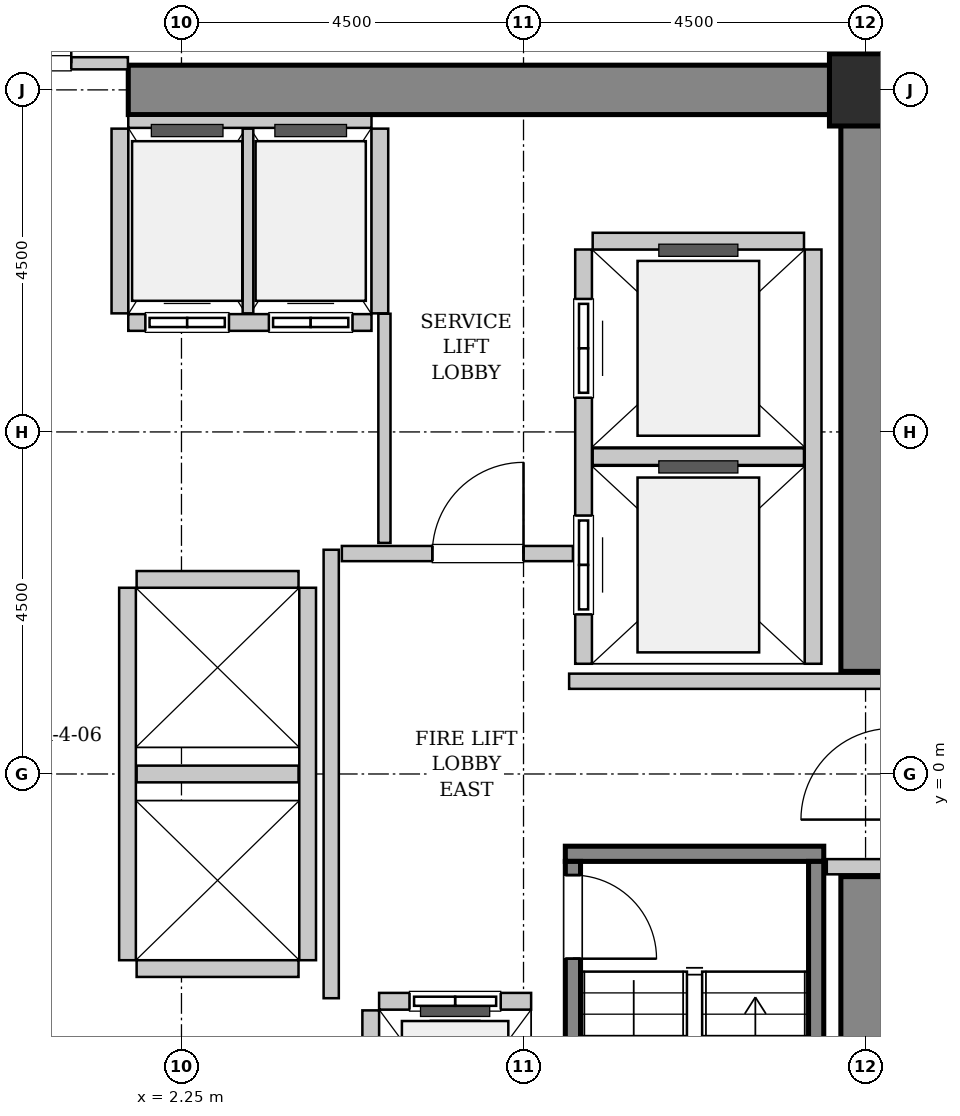
"""IFC4 building model, lengths in metres.
Left out: names, types, materials, properties, quantities, classifications, styles, units other than length and angle.
Written with IfcOpenShell. Run it as: python <this file> out.ifc"""

import sys

from ifc_helpers import new_model, si_unit, direction, frame, frame_2d, origin, origin_2d, place, context, subcontext, project, spatial, rectangle, hollow_rectangle, extrude, source, transform, mapped, element, fill, save


model = new_model("IFC4")
c1 = context("Model", 3, precision=1e-05, world=origin(), true_north=direction((0.0, 1.0)))
c2 = subcontext(c1, "Body", "Model", "MODEL_VIEW")
j1 = project(units=[si_unit("LENGTHUNIT", "METRE"), si_unit("PLANEANGLEUNIT", "RADIAN")], contexts=[c1])
p1 = place(None, origin())
s1 = spatial("IfcSite", under=j1, at=p1, CompositionType="ELEMENT")
p2 = place(p1, origin())
s2 = spatial("IfcBuilding", under=s1, at=p2, CompositionType="ELEMENT")
p3 = place(p2, frame((0.0, 0.0, 82.4)))
s3 = spatial("IfcBuildingStorey", under=s2, at=p3, CompositionType="ELEMENT", Elevation=82.4)
m1 = source(origin(), c2, "Body", "SweptSolid", [
    extrude(rectangle(XDim=10.025, YDim=0.65, at=frame_2d((5.012, 0.0))), origin(), (0.0, 0.0, 1.0), 3.8),
])
p4 = place(p3, frame((1.55, 9.0, 0.0), z_axis=(0.0, 0.0, 1.0), x_axis=(1.0, 0.0, 0.0)))
e1 = element("IfcWall", 1, at=p4, inside=s3, PredefinedType="SHEAR", context=c2, shape_type="MappedRepresentation", body=[
    mapped(m1, transform((0.0, 0.0, 0.0), x_axis=(1.0, 0.0, 0.0), y_axis=(0.0, 1.0, 0.0), z_axis=(0.0, 0.0, 1.0), scale=1.0)),
])
m2 = source(origin(), c2, "Body", "SweptSolid", [
    extrude(rectangle(XDim=7.325, YDim=0.65, at=frame_2d((3.663, 0.0))), origin(), (0.0, 0.0, 1.0), 3.8),
])
for number, where, z_axis, x_axis in (
    (2, (11.25, -8.675, 0.0), (0.0, 0.0, 1.0), (0.0, 1.0, 0.0)),
    (3, (11.25, 1.35, 0.0), (0.0, 0.0, 1.0), (0.0, 1.0, 0.0)),
):
    element("IfcWall", number, at=place(p3, frame(where, z_axis=z_axis, x_axis=x_axis)), inside=s3, PredefinedType="SHEAR", context=c2, shape_type="MappedRepresentation", body=[
        mapped(m2, transform((0.0, 0.0, 0.0), x_axis=(1.0, 0.0, 0.0), y_axis=(0.0, 1.0, 0.0), z_axis=(0.0, 0.0, 1.0), scale=1.0)),
    ])
m3 = source(origin(), c2, "Body", "SweptSolid", [
    extrude(hollow_rectangle(XDim=0.95, YDim=0.95, WallThickness=0.045, InnerFilletRadius=0.045, OuterFilletRadius=0.09, at=origin_2d()), origin(), (0.0, 0.0, 1.0), 3.8),
])
p5 = place(p3, frame((11.25, 9.0, 0.0), z_axis=(0.0, 0.0, 1.0), x_axis=(1.0, 0.0, 0.0)))
e4 = element("IfcColumn", 4, at=p5, inside=s3, PredefinedType="COLUMN", context=c2, shape_type="MappedRepresentation", body=[
    mapped(m3, transform((0.0, 0.0, 0.0), x_axis=(1.0, 0.0, 0.0), y_axis=(0.0, 1.0, 0.0), z_axis=(0.0, 0.0, 1.0), scale=1.0)),
])
m4 = source(origin(), c2, "Body", "SweptSolid", [
    extrude(rectangle(XDim=3.4, YDim=0.2, at=frame_2d((1.7, 0.0))), origin(), (0.0, 0.0, 1.0), 3.8),
])
p6 = place(p3, frame((7.3, -1.05, 0.0), z_axis=(0.0, 0.0, 1.0), x_axis=(1.0, 0.0, 0.0)))
e5 = element("IfcWall", 5, at=p6, inside=s3, PredefinedType="SOLIDWALL", context=c2, shape_type="MappedRepresentation", body=[
    mapped(m4, transform((0.0, 0.0, 0.0), x_axis=(1.0, 0.0, 0.0), y_axis=(0.0, 1.0, 0.0), z_axis=(0.0, 0.0, 1.0), scale=1.0)),
])
m5 = source(origin(), c2, "Body", "SweptSolid", [
    extrude(rectangle(XDim=7.1, YDim=0.2, at=frame_2d((3.55, 0.0))), origin(), (0.0, 0.0, 1.0), 3.8),
])
p7 = place(p3, frame((7.4, -1.15, 0.0), z_axis=(0.0, 0.0, 1.0), x_axis=(0.0, -1.0, 0.0)))
e6 = element("IfcWall", 6, at=p7, inside=s3, PredefinedType="SOLIDWALL", context=c2, shape_type="MappedRepresentation", body=[
    mapped(m5, transform((0.0, 0.0, 0.0), x_axis=(1.0, 0.0, 0.0), y_axis=(0.0, 1.0, 0.0), z_axis=(0.0, 0.0, 1.0), scale=1.0)),
])
p8 = place(p7, frame((0.18, 0.0, 0.0)))
e7 = element("IfcOpeningElement", 7, at=p8, cuts=e6, PredefinedType="OPENING", context=c2, shape_type="SweptSolid", body=[
    extrude(rectangle(XDim=1.1, YDim=2.15, at=frame_2d((0.55, 1.075))), frame((0.0, 0.11, 0.0), z_axis=(0.0, -1.0, 0.0), x_axis=(1.0, 0.0, 0.0)), (0.0, 0.0, 1.0), 0.22),
])
p9 = place(p3, frame((10.6, -1.15, 0.0), z_axis=(0.0, 0.0, 1.0), x_axis=(0.0, -1.0, 0.0)))
e8 = element("IfcWall", 8, at=p9, inside=s3, PredefinedType="SOLIDWALL", context=c2, shape_type="MappedRepresentation", body=[
    mapped(m5, transform((0.0, 0.0, 0.0), x_axis=(1.0, 0.0, 0.0), y_axis=(0.0, 1.0, 0.0), z_axis=(0.0, 0.0, 1.0), scale=1.0)),
])
m6 = source(origin(), c2, "Body", "SweptSolid", [
    extrude(rectangle(XDim=2.0, YDim=0.22, at=frame_2d((1.0, 0.0))), origin(), (0.0, 0.0, 1.0), 3.485),
])
p10 = place(p3, frame((6.85, -2.99, 0.0), z_axis=(0.0, 0.0, 1.0), x_axis=(-1.0, 0.0, 0.0)))
e9 = element("IfcWall", 9, at=p10, inside=s3, PredefinedType="SOLIDWALL", context=c2, shape_type="MappedRepresentation", body=[
    mapped(m6, transform((0.0, 0.0, 0.0), x_axis=(1.0, 0.0, 0.0), y_axis=(0.0, 1.0, 0.0), z_axis=(0.0, 0.0, 1.0), scale=1.0)),
])
p11 = place(p10, frame((0.4, 0.0, 0.0)))
e10 = element("IfcOpeningElement", 10, at=p11, cuts=e9, PredefinedType="OPENING", context=c2, shape_type="SweptSolid", body=[
    extrude(rectangle(XDim=1.2, YDim=2.2, at=frame_2d((0.6, 1.1))), frame((0.0, 0.12, 0.0), z_axis=(0.0, -1.0, 0.0), x_axis=(1.0, 0.0, 0.0)), (0.0, 0.0, 1.0), 0.24),
])
m7 = source(origin(), c2, "Body", "SweptSolid", [
    extrude(rectangle(XDim=2.68, YDim=0.22, at=frame_2d((1.34, 0.0))), origin(), (0.0, 0.0, 1.0), 3.485),
])
p12 = place(p3, frame((4.74, -3.11, 0.0), z_axis=(0.0, 0.0, 1.0), x_axis=(0.0, -1.0, 0.0)))
e11 = element("IfcWall", 11, at=p12, inside=s3, PredefinedType="SOLIDWALL", context=c2, shape_type="MappedRepresentation", body=[
    mapped(m7, transform((0.0, 0.0, 0.0), x_axis=(1.0, 0.0, 0.0), y_axis=(0.0, 1.0, 0.0), z_axis=(0.0, 0.0, 1.0), scale=1.0)),
])
m8 = source(origin(), c2, "Body", "SweptSolid", [
    extrude(rectangle(XDim=5.45, YDim=0.22, at=frame_2d((2.725, 0.0))), origin(), (0.0, 0.0, 1.0), 3.485),
])
p13 = place(p3, frame((7.54, 6.9, 0.0), z_axis=(0.0, 0.0, 1.0), x_axis=(0.0, -1.0, 0.0)))
e12 = element("IfcWall", 12, at=p13, inside=s3, PredefinedType="SOLIDWALL", context=c2, shape_type="MappedRepresentation", body=[
    mapped(m8, transform((0.0, 0.0, 0.0), x_axis=(1.0, 0.0, 0.0), y_axis=(0.0, 1.0, 0.0), z_axis=(0.0, 0.0, 1.0), scale=1.0)),
])
p14 = place(p13, frame((3.5, 0.0, 0.0)))
e13 = element("IfcOpeningElement", 13, at=p14, cuts=e12, PredefinedType="OPENING", context=c2, shape_type="SweptSolid", body=[
    extrude(rectangle(XDim=1.3, YDim=2.3, at=frame_2d((0.65, 1.15))), frame((0.0, 0.12, 0.0), z_axis=(0.0, -1.0, 0.0), x_axis=(1.0, 0.0, 0.0)), (0.0, 0.0, 1.0), 0.24),
])
p15 = place(p13, frame((0.65, 0.0, 0.0)))
e14 = element("IfcOpeningElement", 14, at=p15, cuts=e12, PredefinedType="OPENING", context=c2, shape_type="SweptSolid", body=[
    extrude(rectangle(XDim=1.3, YDim=2.3, at=frame_2d((0.65, 1.15))), frame((0.0, 0.12, 0.0), z_axis=(0.0, -1.0, 0.0), x_axis=(1.0, 0.0, 0.0)), (0.0, 0.0, 1.0), 0.24),
])
p16 = place(p3, frame((10.56, 1.45, 0.0), z_axis=(0.0, 0.0, 1.0), x_axis=(0.0, 1.0, 0.0)))
e15 = element("IfcWall", 15, at=p16, inside=s3, PredefinedType="SOLIDWALL", context=c2, shape_type="MappedRepresentation", body=[
    mapped(m8, transform((0.0, 0.0, 0.0), x_axis=(1.0, 0.0, 0.0), y_axis=(0.0, 1.0, 0.0), z_axis=(0.0, 0.0, 1.0), scale=1.0)),
])
m9 = source(origin(), c2, "Body", "SweptSolid", [
    extrude(rectangle(XDim=2.78, YDim=0.22, at=frame_2d((1.39, 0.0))), origin(), (0.0, 0.0, 1.0), 3.485),
])
for number, where, z_axis, x_axis in (
    (16, (7.66, 4.175, 0.0), (0.0, 0.0, 1.0), (1.0, 0.0, 0.0)),
    (17, (10.44, 7.01, 0.0), (0.0, 0.0, 1.0), (-1.0, 0.0, 0.0)),
):
    element("IfcWall", number, at=place(p3, frame(where, z_axis=z_axis, x_axis=x_axis)), inside=s3, PredefinedType="SOLIDWALL", context=c2, shape_type="MappedRepresentation", body=[
        mapped(m9, transform((0.0, 0.0, 0.0), x_axis=(1.0, 0.0, 0.0), y_axis=(0.0, 1.0, 0.0), z_axis=(0.0, 0.0, 1.0), scale=1.0)),
    ])
m10 = source(origin(), c2, "Body", "SweptSolid", [
    extrude(rectangle(XDim=3.2, YDim=0.22, at=frame_2d((1.6, 0.0))), origin(), (0.0, 0.0, 1.0), 3.485),
])
p17 = place(p3, frame((1.55, 5.94, 0.0), z_axis=(0.0, 0.0, 1.0), x_axis=(1.0, 0.0, 0.0)))
e18 = element("IfcWall", 18, at=p17, inside=s3, PredefinedType="SOLIDWALL", context=c2, shape_type="MappedRepresentation", body=[
    mapped(m10, transform((0.0, 0.0, 0.0), x_axis=(1.0, 0.0, 0.0), y_axis=(0.0, 1.0, 0.0), z_axis=(0.0, 0.0, 1.0), scale=1.0)),
])
p18 = place(p17, frame((0.225, 0.0, 0.0)))
e19 = element("IfcOpeningElement", 19, at=p18, cuts=e18, PredefinedType="OPENING", context=c2, shape_type="SweptSolid", body=[
    extrude(rectangle(XDim=1.1, YDim=2.2, at=frame_2d((0.55, 1.1))), frame((0.0, 0.12, 0.0), z_axis=(0.0, -1.0, 0.0), x_axis=(1.0, 0.0, 0.0)), (0.0, 0.0, 1.0), 0.24),
])
p19 = place(p17, frame((1.85, 0.0, 0.0)))
e20 = element("IfcOpeningElement", 20, at=p19, cuts=e18, PredefinedType="OPENING", context=c2, shape_type="SweptSolid", body=[
    extrude(rectangle(XDim=1.1, YDim=2.2, at=frame_2d((0.55, 1.1))), frame((0.0, 0.12, 0.0), z_axis=(0.0, -1.0, 0.0), x_axis=(1.0, 0.0, 0.0)), (0.0, 0.0, 1.0), 0.24),
])
m11 = source(origin(), c2, "Body", "SweptSolid", [
    extrude(rectangle(XDim=3.2, YDim=0.16, at=frame_2d((1.6, 0.0))), origin(), (0.0, 0.0, 1.0), 2.375),
])
p20 = place(p3, frame((4.75, 8.58, 0.0), z_axis=(0.0, 0.0, 1.0), x_axis=(-1.0, 0.0, 0.0)))
e21 = element("IfcWall", 21, at=p20, inside=s3, PredefinedType="PARTITIONING", context=c2, shape_type="MappedRepresentation", body=[
    mapped(m11, transform((0.0, 0.0, 0.0), x_axis=(1.0, 0.0, 0.0), y_axis=(0.0, 1.0, 0.0), z_axis=(0.0, 0.0, 1.0), scale=1.0)),
])
m12 = source(origin(), c2, "Body", "SweptSolid", [
    extrude(rectangle(XDim=2.43, YDim=0.22, at=frame_2d((1.215, 0.0))), origin(), (0.0, 0.0, 1.0), 3.485),
])
p21 = place(p3, frame((1.44, 8.49, 0.0), z_axis=(0.0, 0.0, 1.0), x_axis=(0.0, -1.0, 0.0)))
e22 = element("IfcWall", 22, at=p21, inside=s3, PredefinedType="SOLIDWALL", context=c2, shape_type="MappedRepresentation", body=[
    mapped(m12, transform((0.0, 0.0, 0.0), x_axis=(1.0, 0.0, 0.0), y_axis=(0.0, 1.0, 0.0), z_axis=(0.0, 0.0, 1.0), scale=1.0)),
])
m13 = source(origin(), c2, "Body", "SweptSolid", [
    extrude(rectangle(XDim=2.43, YDim=0.14, at=frame_2d((1.215, 0.0))), origin(), (0.0, 0.0, 1.0), 3.485),
])
p22 = place(p3, frame((3.125, 6.06, 0.0), z_axis=(0.0, 0.0, 1.0), x_axis=(0.0, 1.0, 0.0)))
e23 = element("IfcWall", 23, at=p22, inside=s3, PredefinedType="PARTITIONING", context=c2, shape_type="MappedRepresentation", body=[
    mapped(m13, transform((0.0, 0.0, 0.0), x_axis=(1.0, 0.0, 0.0), y_axis=(0.0, 1.0, 0.0), z_axis=(0.0, 0.0, 1.0), scale=1.0)),
])
p23 = place(p3, frame((4.86, 6.06, 0.0), z_axis=(0.0, 0.0, 1.0), x_axis=(0.0, 1.0, 0.0)))
e24 = element("IfcWall", 24, at=p23, inside=s3, PredefinedType="SOLIDWALL", context=c2, shape_type="MappedRepresentation", body=[
    mapped(m12, transform((0.0, 0.0, 0.0), x_axis=(1.0, 0.0, 0.0), y_axis=(0.0, 1.0, 0.0), z_axis=(0.0, 0.0, 1.0), scale=1.0)),
])
m14 = source(origin(), c2, "Body", "SweptSolid", [
    extrude(rectangle(XDim=4.9, YDim=0.22, at=frame_2d((2.45, 0.0))), origin(), (0.0, 0.0, 1.0), 3.485),
])
for number, where, z_axis, x_axis in (
    (25, (1.54, 2.45, 0.0), (0.0, 0.0, 1.0), (0.0, -1.0, 0.0)),
    (26, (3.91, -2.45, 0.0), (0.0, 0.0, 1.0), (0.0, 1.0, 0.0)),
):
    element("IfcWall", number, at=place(p3, frame(where, z_axis=z_axis, x_axis=x_axis)), inside=s3, PredefinedType="SOLIDWALL", context=c2, shape_type="MappedRepresentation", body=[
        mapped(m14, transform((0.0, 0.0, 0.0), x_axis=(1.0, 0.0, 0.0), y_axis=(0.0, 1.0, 0.0), z_axis=(0.0, 0.0, 1.0), scale=1.0)),
    ])
m15 = source(origin(), c2, "Body", "SweptSolid", [
    extrude(rectangle(XDim=2.13, YDim=0.22, at=frame_2d((1.065, 0.0))), origin(), (0.0, 0.0, 1.0), 3.485),
])
for number, where, z_axis, x_axis in (
    (27, (1.66, -2.56, 0.0), (0.0, 0.0, 1.0), (1.0, 0.0, 0.0)),
    (28, (1.66, 0.0, 0.0), (0.0, 0.0, 1.0), (1.0, 0.0, 0.0)),
    (29, (3.79, 2.56, 0.0), (0.0, 0.0, 1.0), (-1.0, 0.0, 0.0)),
):
    element("IfcWall", number, at=place(p3, frame(where, z_axis=z_axis, x_axis=x_axis)), inside=s3, PredefinedType="SOLIDWALL", context=c2, shape_type="MappedRepresentation", body=[
        mapped(m15, transform((0.0, 0.0, 0.0), x_axis=(1.0, 0.0, 0.0), y_axis=(0.0, 1.0, 0.0), z_axis=(0.0, 0.0, 1.0), scale=1.0)),
    ])
m16 = source(origin(), c2, "Body", "SweptSolid", [
    extrude(rectangle(XDim=5.9, YDim=0.2, at=frame_2d((2.95, 0.0))), origin(), (0.0, 0.0, 1.0), 3.485),
])
p24 = place(p3, frame((4.22, -2.95, 0.0), z_axis=(0.0, 0.0, 1.0), x_axis=(0.0, 1.0, 0.0)))
e30 = element("IfcWall", 30, at=p24, inside=s3, PredefinedType="PARTITIONING", context=c2, shape_type="MappedRepresentation", body=[
    mapped(m16, transform((0.0, 0.0, 0.0), x_axis=(1.0, 0.0, 0.0), y_axis=(0.0, 1.0, 0.0), z_axis=(0.0, 0.0, 1.0), scale=1.0)),
])
m17 = source(origin(), c2, "Body", "SweptSolid", [
    extrude(rectangle(XDim=3.04, YDim=0.2, at=frame_2d((1.52, 0.0))), origin(), (0.0, 0.0, 1.0), 3.485),
])
p25 = place(p3, frame((4.36, 2.9, 0.0), z_axis=(0.0, 0.0, 1.0), x_axis=(1.0, 0.0, 0.0)))
e31 = element("IfcWall", 31, at=p25, inside=s3, PredefinedType="PARTITIONING", context=c2, shape_type="MappedRepresentation", body=[
    mapped(m17, transform((0.0, 0.0, 0.0), x_axis=(1.0, 0.0, 0.0), y_axis=(0.0, 1.0, 0.0), z_axis=(0.0, 0.0, 1.0), scale=1.0)),
])
p26 = place(p25, frame((1.19, 0.0, 0.0)))
e32 = element("IfcOpeningElement", 32, at=p26, cuts=e31, PredefinedType="OPENING", context=c2, shape_type="SweptSolid", body=[
    extrude(rectangle(XDim=1.2, YDim=2.15, at=frame_2d((0.6, 1.075))), frame((0.0, 0.11, 0.0), z_axis=(0.0, -1.0, 0.0), x_axis=(1.0, 0.0, 0.0)), (0.0, 0.0, 1.0), 0.22),
])
m18 = source(origin(), c2, "Body", "SweptSolid", [
    extrude(rectangle(XDim=4.11, YDim=0.2, at=frame_2d((2.055, 0.0))), origin(), (0.0, 0.0, 1.0), 3.485),
])
p27 = place(p3, frame((7.35, 1.22, 0.0), z_axis=(0.0, 0.0, 1.0), x_axis=(1.0, 0.0, 0.0)))
e33 = element("IfcWall", 33, at=p27, inside=s3, PredefinedType="PARTITIONING", context=c2, shape_type="MappedRepresentation", body=[
    mapped(m18, transform((0.0, 0.0, 0.0), x_axis=(1.0, 0.0, 0.0), y_axis=(0.0, 1.0, 0.0), z_axis=(0.0, 0.0, 1.0), scale=1.0)),
])
m19 = source(origin(), c2, "Body", "SweptSolid", [
    extrude(rectangle(XDim=0.72, YDim=0.2, at=frame_2d((0.36, 0.0))), origin(), (0.0, 0.0, 1.0), 3.485),
])
p28 = place(p3, frame((10.74, -1.22, 0.0), z_axis=(0.0, 0.0, 1.0), x_axis=(1.0, 0.0, 0.0)))
e34 = element("IfcWall", 34, at=p28, inside=s3, PredefinedType="PARTITIONING", context=c2, shape_type="MappedRepresentation", body=[
    mapped(m19, transform((0.0, 0.0, 0.0), x_axis=(1.0, 0.0, 0.0), y_axis=(0.0, 1.0, 0.0), z_axis=(0.0, 0.0, 1.0), scale=1.0)),
])
m20 = source(origin(), c2, "Body", "SweptSolid", [
    extrude(rectangle(XDim=3.09, YDim=0.16, at=frame_2d((1.545, 0.0))), origin(), (0.0, 0.0, 1.0), 2.375),
])
p29 = place(p3, frame((-1.545, 9.35, 0.0), z_axis=(0.0, 0.0, 1.0), x_axis=(1.0, 0.0, 0.0)))
e35 = element("IfcWall", 35, at=p29, inside=s3, PredefinedType="PARTITIONING", context=c2, shape_type="MappedRepresentation", body=[
    mapped(m20, transform((0.0, 0.0, 0.0), x_axis=(1.0, 0.0, 0.0), y_axis=(0.0, 1.0, 0.0), z_axis=(0.0, 0.0, 1.0), scale=1.0)),
])
p30 = place(p29, frame((0.745, 0.0, 0.0)))
e36 = element("IfcOpeningElement", 36, at=p30, cuts=e35, PredefinedType="OPENING", context=c2, shape_type="SweptSolid", body=[
    extrude(rectangle(XDim=1.6, YDim=2.3, at=frame_2d((0.8, 1.15))), frame((0.0, 0.09, 0.0), z_axis=(0.0, -1.0, 0.0), x_axis=(1.0, 0.0, 0.0)), (0.0, 0.0, 1.0), 0.18),
])
m21 = source(origin(), c2, "Body", "SweptSolid", [
    extrude(rectangle(XDim=3.015, YDim=0.16, at=frame_2d((1.507, 0.0))), origin(), (0.0, 0.0, 1.0), 3.485),
])
p31 = place(p3, frame((4.92, 3.04, 0.0), z_axis=(0.0, 0.0, 1.0), x_axis=(0.0, 1.0, 0.0)))
e37 = element("IfcWall", 37, at=p31, inside=s3, PredefinedType="PARTITIONING", context=c2, shape_type="MappedRepresentation", body=[
    mapped(m21, transform((0.0, 0.0, 0.0), x_axis=(1.0, 0.0, 0.0), y_axis=(0.0, 1.0, 0.0), z_axis=(0.0, 0.0, 1.0), scale=1.0)),
])
m22 = source(origin(), c2, "Body", "SweptSolid", [
    extrude(rectangle(XDim=1.1, YDim=2.15, at=frame_2d((0.55, 1.075))), frame((0.0, 0.025, 0.0), z_axis=(0.0, -1.0, 0.0), x_axis=(1.0, 0.0, 0.0)), (0.0, 0.0, 1.0), 0.05),
])
p32 = place(p8, origin())
e38 = element("IfcDoor", 38, at=p32, inside=s3, OperationType="SINGLE_SWING_RIGHT", PredefinedType="DOOR", context=c2, shape_type="MappedRepresentation", body=[
    mapped(m22, transform((0.0, 0.0, 0.0), x_axis=(1.0, 0.0, 0.0), y_axis=(0.0, 1.0, 0.0), z_axis=(0.0, 0.0, 1.0), scale=1.0)),
])
fill(e7, e38)
m23 = source(origin(), c2, "Body", "SweptSolid", [
    extrude(rectangle(XDim=1.2, YDim=2.2, at=frame_2d((0.6, 1.1))), frame((0.0, 0.025, 0.0), z_axis=(0.0, -1.0, 0.0), x_axis=(1.0, 0.0, 0.0)), (0.0, 0.0, 1.0), 0.05),
])
p33 = place(p11, origin())
e39 = element("IfcDoor", 39, at=p33, inside=s3, OperationType="SLIDING_TO_LEFT", PredefinedType="DOOR", context=c2, shape_type="MappedRepresentation", body=[
    mapped(m23, transform((0.0, 0.0, 0.0), x_axis=(1.0, 0.0, 0.0), y_axis=(0.0, 1.0, 0.0), z_axis=(0.0, 0.0, 1.0), scale=1.0)),
])
fill(e10, e39)
m24 = source(origin(), c2, "Body", "SweptSolid", [
    extrude(rectangle(XDim=1.3, YDim=2.3, at=frame_2d((0.65, 1.15))), frame((0.0, 0.025, 0.0), z_axis=(0.0, -1.0, 0.0), x_axis=(1.0, 0.0, 0.0)), (0.0, 0.0, 1.0), 0.05),
])
p34 = place(p14, origin())
e40 = element("IfcDoor", 40, at=p34, inside=s3, OperationType="SLIDING_TO_RIGHT", PredefinedType="DOOR", context=c2, shape_type="MappedRepresentation", body=[
    mapped(m24, transform((0.0, 0.0, 0.0), x_axis=(1.0, 0.0, 0.0), y_axis=(0.0, 1.0, 0.0), z_axis=(0.0, 0.0, 1.0), scale=1.0)),
])
fill(e13, e40)
p35 = place(p15, origin())
e41 = element("IfcDoor", 41, at=p35, inside=s3, OperationType="SLIDING_TO_RIGHT", PredefinedType="DOOR", context=c2, shape_type="MappedRepresentation", body=[
    mapped(m24, transform((0.0, 0.0, 0.0), x_axis=(1.0, 0.0, 0.0), y_axis=(0.0, 1.0, 0.0), z_axis=(0.0, 0.0, 1.0), scale=1.0)),
])
fill(e14, e41)
m25 = source(origin(), c2, "Body", "SweptSolid", [
    extrude(rectangle(XDim=1.1, YDim=2.2, at=frame_2d((0.55, 1.1))), frame((0.0, 0.025, 0.0), z_axis=(0.0, -1.0, 0.0), x_axis=(1.0, 0.0, 0.0)), (0.0, 0.0, 1.0), 0.05),
])
p36 = place(p18, origin())
e42 = element("IfcDoor", 42, at=p36, inside=s3, OperationType="DOUBLE_DOOR_SLIDING", PredefinedType="DOOR", context=c2, shape_type="MappedRepresentation", body=[
    mapped(m25, transform((0.0, 0.0, 0.0), x_axis=(1.0, 0.0, 0.0), y_axis=(0.0, 1.0, 0.0), z_axis=(0.0, 0.0, 1.0), scale=1.0)),
])
fill(e19, e42)
p37 = place(p19, origin())
e43 = element("IfcDoor", 43, at=p37, inside=s3, OperationType="DOUBLE_DOOR_SLIDING", PredefinedType="DOOR", context=c2, shape_type="MappedRepresentation", body=[
    mapped(m25, transform((0.0, 0.0, 0.0), x_axis=(1.0, 0.0, 0.0), y_axis=(0.0, 1.0, 0.0), z_axis=(0.0, 0.0, 1.0), scale=1.0)),
])
fill(e20, e43)
m26 = source(origin(), c2, "Body", "SweptSolid", [
    extrude(rectangle(XDim=1.2, YDim=2.15, at=frame_2d((0.6, 1.075))), frame((0.0, 0.025, 0.0), z_axis=(0.0, -1.0, 0.0), x_axis=(1.0, 0.0, 0.0)), (0.0, 0.0, 1.0), 0.05),
])
p38 = place(p26, origin())
e44 = element("IfcDoor", 44, at=p38, inside=s3, OperationType="SINGLE_SWING_RIGHT", PredefinedType="DOOR", context=c2, shape_type="MappedRepresentation", body=[
    mapped(m26, transform((0.0, 0.0, 0.0), x_axis=(1.0, 0.0, 0.0), y_axis=(0.0, 1.0, 0.0), z_axis=(0.0, 0.0, 1.0), scale=1.0)),
])
fill(e32, e44)
m27 = source(origin(), c2, "Body", "SweptSolid", [
    extrude(rectangle(XDim=1.6, YDim=2.3, at=frame_2d((0.8, 1.15))), frame((0.0, 0.025, 0.0), z_axis=(0.0, -1.0, 0.0), x_axis=(1.0, 0.0, 0.0)), (0.0, 0.0, 1.0), 0.05),
])
p39 = place(p30, origin())
e45 = element("IfcDoor", 45, at=p39, inside=s3, OperationType="DOUBLE_DOOR_SINGLE_SWING", PredefinedType="DOOR", context=c2, shape_type="MappedRepresentation", body=[
    mapped(m27, transform((0.0, 0.0, 0.0), x_axis=(1.0, 0.0, 0.0), y_axis=(0.0, 1.0, 0.0), z_axis=(0.0, 0.0, 1.0), scale=1.0)),
])
fill(e36, e45)
save(model, sys.argv[1])
